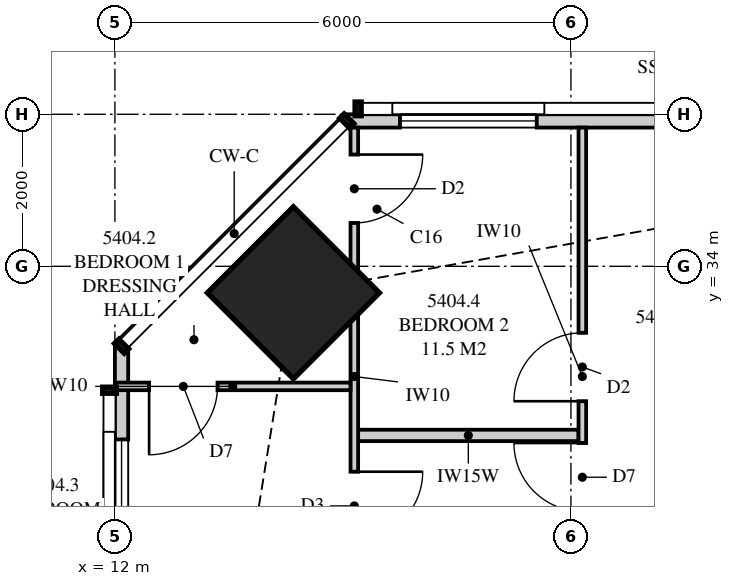
"""IFC4 building model, lengths in metres.
Left out: names, types, materials, properties, quantities, classifications, styles, units other than length and angle.
Written with IfcOpenShell. Run it as: python <this file> out.ifc"""

import sys

from ifc_helpers import new_model, si_unit, direction, frame, frame_2d, origin, origin_2d, place, context, subcontext, project, spatial, polyline, rectangle, outline, extrude, element, fill, save


model = new_model("IFC4")
c1 = context("Model", 3, precision=1e-05, world=origin(), true_north=direction((0.0, 1.0)))
c2 = subcontext(c1, "Body", "Model", "MODEL_VIEW")
j1 = project(units=[si_unit("LENGTHUNIT", "METRE"), si_unit("PLANEANGLEUNIT", "RADIAN")], contexts=[c1])
p1 = place(None, origin())
s1 = spatial("IfcSite", under=j1, at=p1, CompositionType="ELEMENT")
p2 = place(p1, origin())
s2 = spatial("IfcBuilding", under=s1, at=p2, CompositionType="ELEMENT")
p3 = place(p2, frame((0.0, 0.0, 197.9)))
s3 = spatial("IfcBuildingStorey", under=s2, at=p3, CompositionType="ELEMENT", Elevation=197.9)
p4 = place(p3, frame((14.348, 33.652, 0.0), z_axis=(0.0, 0.0, 1.0), x_axis=(0.707106781187, 0.707106781187, 0.0)))
e1 = element("IfcColumn", 1, at=p4, inside=s3, PredefinedType="COLUMN", context=c2, shape_type="SweptSolid", body=[
    extrude(rectangle(XDim=1.6, YDim=1.6, at=origin_2d()), origin(), (0.0, 0.0, 1.0), 3.35),
])
p5 = place(p3, frame((49.949, 35.913, 0.0), z_axis=(0.0, 0.0, 1.0), x_axis=(-1.0, 0.0, 0.0)))
e2 = element("IfcWall", 2, at=p5, inside=s3, PredefinedType="SOLIDWALL", context=c2, shape_type="SweptSolid", body=[
    extrude(outline(polyline([(0.0, 0.0), (34.897, 0.0), (34.897, 3.11), (27.91, 3.11), (27.91, 2.15), (27.836, 2.15), (27.836, 3.11), (27.699, 3.11), (27.699, 2.15), (7.199, 2.15), (7.199, 3.11), (7.062, 3.11), (7.062, 2.15), (6.987, 2.15), (6.987, 3.11), (0.0, 3.11), (0.0, 0.0)])), frame((0.0, 0.087, 0.0), z_axis=(0.0, -1.0, 0.0), x_axis=(1.0, 0.0, 0.0)), (0.0, 0.0, 1.0), 0.175),
])
p6 = place(p5, frame((2.149, 0.0, 0.4)))
e3 = element("IfcOpeningElement", 3, at=p6, cuts=e2, PredefinedType="OPENING", context=c2, shape_type="SweptSolid", body=[
    extrude(rectangle(XDim=1.8, YDim=1.7, at=frame_2d((0.9, 0.85))), frame((0.0, 0.097, 0.0), z_axis=(0.0, -1.0, 0.0), x_axis=(1.0, 0.0, 0.0)), (0.0, 0.0, 1.0), 0.195),
])
p7 = place(p5, frame((9.636, 0.0, 0.4)))
e4 = element("IfcOpeningElement", 4, at=p7, cuts=e2, PredefinedType="OPENING", context=c2, shape_type="SweptSolid", body=[
    extrude(rectangle(XDim=1.8, YDim=1.7, at=frame_2d((0.9, 0.85))), frame((0.0, 0.097, 0.0), z_axis=(0.0, -1.0, 0.0), x_axis=(1.0, 0.0, 0.0)), (0.0, 0.0, 1.0), 0.195),
])
p8 = place(p5, frame((13.174, 0.0, 0.0)))
e5 = element("IfcOpeningElement", 5, at=p8, cuts=e2, PredefinedType="OPENING", context=c2, shape_type="SweptSolid", body=[
    extrude(rectangle(XDim=1.8, YDim=2.1, at=frame_2d((0.9, 1.05))), frame((0.0, 0.097, 0.0), z_axis=(0.0, -1.0, 0.0), x_axis=(1.0, 0.0, 0.0)), (0.0, 0.0, 1.0), 0.195),
])
p9 = place(p5, frame((19.374, 0.0, 0.4)))
e6 = element("IfcOpeningElement", 6, at=p9, cuts=e2, PredefinedType="OPENING", context=c2, shape_type="SweptSolid", body=[
    extrude(rectangle(XDim=1.8, YDim=1.7, at=frame_2d((0.9, 0.85))), frame((0.0, 0.097, 0.0), z_axis=(0.0, -1.0, 0.0), x_axis=(1.0, 0.0, 0.0)), (0.0, 0.0, 1.0), 0.195),
])
p10 = place(p5, frame((23.224, 0.0, 0.4)))
e7 = element("IfcOpeningElement", 7, at=p10, cuts=e2, PredefinedType="OPENING", context=c2, shape_type="SweptSolid", body=[
    extrude(rectangle(XDim=2.4, YDim=1.7, at=frame_2d((1.2, 0.85))), frame((0.0, 0.097, 0.0), z_axis=(0.0, -1.0, 0.0), x_axis=(1.0, 0.0, 0.0)), (0.0, 0.0, 1.0), 0.195),
])
p11 = place(p5, frame((32.399, 0.0, 0.4)))
e8 = element("IfcOpeningElement", 8, at=p11, cuts=e2, PredefinedType="OPENING", context=c2, shape_type="SweptSolid", body=[
    extrude(rectangle(XDim=1.8, YDim=1.7, at=frame_2d((0.9, 0.85))), frame((0.0, 0.097, 0.0), z_axis=(0.0, -1.0, 0.0), x_axis=(1.0, 0.0, 0.0)), (0.0, 0.0, 1.0), 0.195),
])
p12 = place(p3, frame((12.087, 32.949, 0.0), z_axis=(0.0, 0.0, 1.0), x_axis=(0.0, -1.0, 0.0)))
e9 = element("IfcWall", 9, at=p12, inside=s3, PredefinedType="SOLIDWALL", context=c2, shape_type="SweptSolid", body=[
    extrude(outline(polyline([(0.0, 0.0), (29.897, 0.0), (29.897, 3.11), (20.191, 3.11), (20.191, 2.15), (20.051, 2.15), (20.051, 3.11), (19.949, 3.11), (19.949, 2.15), (7.949, 2.15), (7.949, 3.11), (7.823, 3.11), (7.823, 2.15), (7.73, 2.15), (7.73, 3.11), (0.0, 3.11), (0.0, 0.0)])), frame((0.0, 0.087, 0.0), z_axis=(0.0, -1.0, 0.0), x_axis=(1.0, 0.0, 0.0)), (0.0, 0.0, 1.0), 0.175),
])
p13 = place(p12, frame((1.226, 0.0, 0.4)))
e10 = element("IfcOpeningElement", 10, at=p13, cuts=e9, PredefinedType="OPENING", context=c2, shape_type="SweptSolid", body=[
    extrude(rectangle(XDim=1.8, YDim=1.7, at=frame_2d((0.9, 0.85))), frame((0.0, 0.097, 0.0), z_axis=(0.0, -1.0, 0.0), x_axis=(1.0, 0.0, 0.0)), (0.0, 0.0, 1.0), 0.195),
])
p14 = place(p12, frame((9.899, 0.0, 0.4)))
e11 = element("IfcOpeningElement", 11, at=p14, cuts=e9, PredefinedType="OPENING", context=c2, shape_type="SweptSolid", body=[
    extrude(rectangle(XDim=1.8, YDim=1.7, at=frame_2d((0.9, 0.85))), frame((0.0, 0.097, 0.0), z_axis=(0.0, -1.0, 0.0), x_axis=(1.0, 0.0, 0.0)), (0.0, 0.0, 1.0), 0.195),
])
p15 = place(p12, frame((13.024, 0.0, 0.4)))
e12 = element("IfcOpeningElement", 12, at=p15, cuts=e9, PredefinedType="OPENING", context=c2, shape_type="SweptSolid", body=[
    extrude(rectangle(XDim=1.8, YDim=1.7, at=frame_2d((0.9, 0.85))), frame((0.0, 0.097, 0.0), z_axis=(0.0, -1.0, 0.0), x_axis=(1.0, 0.0, 0.0)), (0.0, 0.0, 1.0), 0.195),
])
p16 = place(p12, frame((16.201, 0.0, 0.4)))
e13 = element("IfcOpeningElement", 13, at=p16, cuts=e9, PredefinedType="OPENING", context=c2, shape_type="SweptSolid", body=[
    extrude(rectangle(XDim=1.8, YDim=1.7, at=frame_2d((0.9, 0.85))), frame((0.0, 0.097, 0.0), z_axis=(0.0, -1.0, 0.0), x_axis=(1.0, 0.0, 0.0)), (0.0, 0.0, 1.0), 0.195),
])
p17 = place(p12, frame((22.624, 0.0, 0.0)))
e14 = element("IfcOpeningElement", 14, at=p17, cuts=e9, PredefinedType="OPENING", context=c2, shape_type="SweptSolid", body=[
    extrude(rectangle(XDim=1.8, YDim=2.1, at=frame_2d((0.9, 1.05))), frame((0.0, 0.097, 0.0), z_axis=(0.0, -1.0, 0.0), x_axis=(1.0, 0.0, 0.0)), (0.0, 0.0, 1.0), 0.195),
])
p18 = place(p12, frame((26.099, 0.0, 0.4)))
e15 = element("IfcOpeningElement", 15, at=p18, cuts=e9, PredefinedType="OPENING", context=c2, shape_type="SweptSolid", body=[
    extrude(rectangle(XDim=1.2, YDim=1.7, at=frame_2d((0.6, 0.85))), frame((0.0, 0.097, 0.0), z_axis=(0.0, -1.0, 0.0), x_axis=(1.0, 0.0, 0.0)), (0.0, 0.0, 1.0), 0.195),
])
p19 = place(p3, frame((15.15, 35.825, 0.0), z_axis=(0.0, 0.0, 1.0), x_axis=(0.0, -1.0, 0.0)))
e16 = element("IfcWall", 16, at=p19, inside=s3, PredefinedType="PARTITIONING", context=c2, shape_type="SweptSolid", body=[
    extrude(outline(polyline([(0.0, 0.0), (6.55, 0.0), (6.55, 3.11), (2.905, 3.11), (2.905, 2.15), (1.158, 2.15), (1.158, 3.11), (0.0, 3.11), (0.0, 0.0)])), frame((0.0, 0.05, 0.0), z_axis=(0.0, -1.0, 0.0), x_axis=(1.0, 0.0, 0.0)), (0.0, 0.0, 1.0), 0.1),
])
p20 = place(p19, frame((0.355, 0.0, 0.0)))
e17 = element("IfcOpeningElement", 17, at=p20, cuts=e16, PredefinedType="OPENING", context=c2, shape_type="SweptSolid", body=[
    extrude(rectangle(XDim=0.9, YDim=2.1, at=frame_2d((0.45, 1.05))), frame((0.0, 0.06, 0.0), z_axis=(0.0, -1.0, 0.0), x_axis=(1.0, 0.0, 0.0)), (0.0, 0.0, 1.0), 0.12),
])
p21 = place(p19, frame((4.527, 0.0, 0.0)))
e18 = element("IfcOpeningElement", 18, at=p21, cuts=e16, PredefinedType="OPENING", context=c2, shape_type="SweptSolid", body=[
    extrude(rectangle(XDim=0.9, YDim=2.1, at=frame_2d((0.45, 1.05))), frame((0.0, 0.06, 0.0), z_axis=(0.0, -1.0, 0.0), x_axis=(1.0, 0.0, 0.0)), (0.0, 0.0, 1.0), 0.12),
])
p22 = place(p3, frame((18.15, 35.825, 0.0), z_axis=(0.0, 0.0, 1.0), x_axis=(0.0, -1.0, 0.0)))
e19 = element("IfcWall", 19, at=p22, inside=s3, PredefinedType="PARTITIONING", context=c2, shape_type="SweptSolid", body=[
    extrude(outline(polyline([(0.0, 0.0), (6.55, 0.0), (6.55, 3.11), (2.374, 3.11), (2.374, 2.15), (0.627, 2.15), (0.627, 3.11), (0.0, 3.11), (0.0, 0.0)])), frame((0.0, 0.05, 0.0), z_axis=(0.0, -1.0, 0.0), x_axis=(1.0, 0.0, 0.0)), (0.0, 0.0, 1.0), 0.1),
])
p23 = place(p22, frame((2.7, 0.0, 0.0)))
e20 = element("IfcOpeningElement", 20, at=p23, cuts=e19, PredefinedType="OPENING", context=c2, shape_type="SweptSolid", body=[
    extrude(rectangle(XDim=0.9, YDim=2.1, at=frame_2d((0.45, 1.05))), frame((0.0, 0.06, 0.0), z_axis=(0.0, -1.0, 0.0), x_axis=(1.0, 0.0, 0.0)), (0.0, 0.0, 1.0), 0.12),
])
p24 = place(p22, frame((4.15, 0.0, 0.0)))
e21 = element("IfcOpeningElement", 21, at=p24, cuts=e19, PredefinedType="OPENING", context=c2, shape_type="SweptSolid", body=[
    extrude(rectangle(XDim=0.9, YDim=2.1, at=frame_2d((0.45, 1.05))), frame((0.0, 0.06, 0.0), z_axis=(0.0, -1.0, 0.0), x_axis=(1.0, 0.0, 0.0)), (0.0, 0.0, 1.0), 0.12),
])
p25 = place(p3, frame((12.0, 32.42, 0.0), z_axis=(0.0, 0.0, 1.0), x_axis=(1.0, 0.0, 0.0)))
e22 = element("IfcWall", 22, at=p25, inside=s3, PredefinedType="PARTITIONING", context=c2, shape_type="SweptSolid", body=[
    extrude(outline(polyline([(0.0, 0.0), (3.1, 0.0), (3.1, 3.11), (3.021, 3.11), (3.021, 2.15), (1.278, 2.15), (1.278, 3.11), (0.0, 3.11), (0.0, 0.0)])), frame((0.0, 0.05, 0.0), z_axis=(0.0, -1.0, 0.0), x_axis=(1.0, 0.0, 0.0)), (0.0, 0.0, 1.0), 0.1),
])
p26 = place(p25, frame((0.45, 0.0, 0.0)))
e23 = element("IfcOpeningElement", 23, at=p26, cuts=e22, PredefinedType="OPENING", context=c2, shape_type="SweptSolid", body=[
    extrude(rectangle(XDim=0.9, YDim=2.1, at=frame_2d((0.45, 1.05))), frame((0.0, 0.06, 0.0), z_axis=(0.0, -1.0, 0.0), x_axis=(1.0, 0.0, 0.0)), (0.0, 0.0, 1.0), 0.12),
])
p27 = place(p3, frame((15.2, 31.775, 0.0), z_axis=(0.0, 0.0, 1.0), x_axis=(1.0, 0.0, 0.0)))
e24 = element("IfcWall", 24, at=p27, inside=s3, PredefinedType="PLUMBINGWALL", context=c2, shape_type="SweptSolid", body=[
    extrude(rectangle(XDim=2.9, YDim=0.15, at=frame_2d((1.45, 0.0))), origin(), (0.0, 0.0, 1.0), 3.11),
])
p28 = place(p11, origin())
e25 = element("IfcWindow", 25, at=p28, inside=s3, PartitioningType="SINGLE_PANEL", PredefinedType="WINDOW", context=c2, shape_type="SweptSolid", body=[
    extrude(rectangle(XDim=1.8, YDim=1.7, at=frame_2d((0.9, 0.85))), frame((0.0, 0.03, 0.0), z_axis=(0.0, -1.0, 0.0), x_axis=(1.0, 0.0, 0.0)), (0.0, 0.0, 1.0), 0.06),
])
fill(e8, e25)
p29 = place(p13, origin())
e26 = element("IfcWindow", 26, at=p29, inside=s3, PartitioningType="SINGLE_PANEL", PredefinedType="WINDOW", context=c2, shape_type="SweptSolid", body=[
    extrude(rectangle(XDim=1.8, YDim=1.7, at=frame_2d((0.9, 0.85))), frame((0.0, 0.03, 0.0), z_axis=(0.0, -1.0, 0.0), x_axis=(1.0, 0.0, 0.0)), (0.0, 0.0, 1.0), 0.06),
])
fill(e10, e26)
p30 = place(p26, frame((0.9, 0.0, 0.0), z_axis=(0.0, 0.0, 1.0), x_axis=(-1.0, 0.0, 0.0)))
e27 = element("IfcDoor", 27, at=p30, inside=s3, OperationType="SINGLE_SWING_RIGHT", PredefinedType="DOOR", context=c2, shape_type="SweptSolid", body=[
    extrude(rectangle(XDim=0.9, YDim=2.1, at=frame_2d((0.45, 1.05))), frame((0.0, 0.025, 0.0), z_axis=(0.0, -1.0, 0.0), x_axis=(1.0, 0.0, 0.0)), (0.0, 0.0, 1.0), 0.05),
])
fill(e23, e27)
p31 = place(p20, origin())
e28 = element("IfcDoor", 28, at=p31, inside=s3, OperationType="SINGLE_SWING_LEFT", PredefinedType="DOOR", context=c2, shape_type="SweptSolid", body=[
    extrude(rectangle(XDim=0.9, YDim=2.1, at=frame_2d((0.45, 1.05))), frame((0.0, 0.025, 0.0), z_axis=(0.0, -1.0, 0.0), x_axis=(1.0, 0.0, 0.0)), (0.0, 0.0, 1.0), 0.05),
])
fill(e17, e28)
p32 = place(p23, frame((0.9, 0.0, 0.0), z_axis=(0.0, 0.0, 1.0), x_axis=(-1.0, 0.0, 0.0)))
e29 = element("IfcDoor", 29, at=p32, inside=s3, OperationType="SINGLE_SWING_LEFT", PredefinedType="DOOR", context=c2, shape_type="SweptSolid", body=[
    extrude(rectangle(XDim=0.9, YDim=2.1, at=frame_2d((0.45, 1.05))), frame((0.0, 0.025, 0.0), z_axis=(0.0, -1.0, 0.0), x_axis=(1.0, 0.0, 0.0)), (0.0, 0.0, 1.0), 0.05),
])
fill(e20, e29)
p33 = place(p24, frame((0.9, 0.0, 0.0), z_axis=(0.0, 0.0, 1.0), x_axis=(-1.0, 0.0, 0.0)))
e30 = element("IfcDoor", 30, at=p33, inside=s3, OperationType="SINGLE_SWING_RIGHT", PredefinedType="DOOR", context=c2, shape_type="SweptSolid", body=[
    extrude(rectangle(XDim=0.9, YDim=2.1, at=frame_2d((0.45, 1.05))), frame((0.0, 0.025, 0.0), z_axis=(0.0, -1.0, 0.0), x_axis=(1.0, 0.0, 0.0)), (0.0, 0.0, 1.0), 0.05),
])
fill(e21, e30)
p34 = place(p21, origin())
e31 = element("IfcDoor", 31, at=p34, inside=s3, OperationType="SINGLE_SWING_LEFT", PredefinedType="DOOR", context=c2, shape_type="SweptSolid", body=[
    extrude(rectangle(XDim=0.9, YDim=2.1, at=frame_2d((0.45, 1.05))), frame((0.0, 0.025, 0.0), z_axis=(0.0, -1.0, 0.0), x_axis=(1.0, 0.0, 0.0)), (0.0, 0.0, 1.0), 0.05),
])
fill(e18, e31)
save(model, sys.argv[1])
